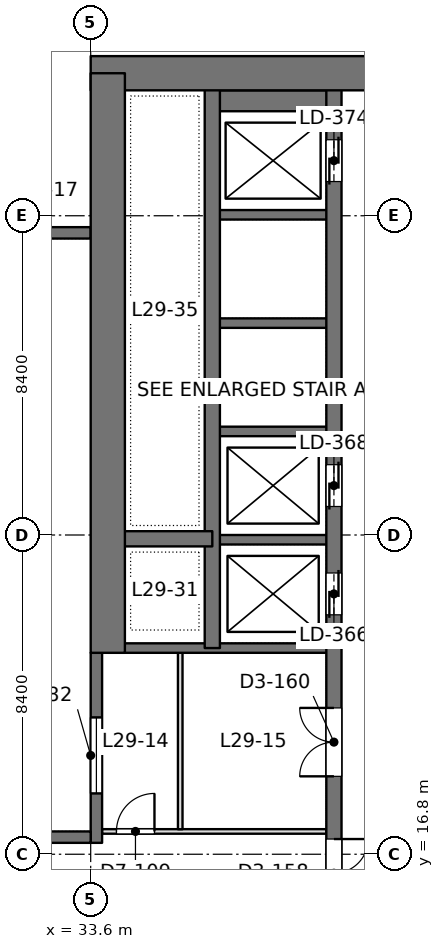
"""IFC4 building model, lengths in metres.
Left out: names, types, materials, properties, quantities, classifications, styles, units other than length and angle.
Written with IfcOpenShell. Run it as: python <this file> out.ifc"""

import sys

from ifc_helpers import new_model, si_unit, direction, frame, frame_2d, origin, place, context, subcontext, project, spatial, rectangle, extrude, element, fill, save


model = new_model("IFC4")
c1 = context("Model", 3, precision=1e-05, world=origin(), true_north=direction((0.0, 1.0)))
c2 = subcontext(c1, "Body", "Model", "MODEL_VIEW")
j1 = project(units=[si_unit("LENGTHUNIT", "METRE"), si_unit("PLANEANGLEUNIT", "RADIAN")], contexts=[c1])
p1 = place(None, origin())
s1 = spatial("IfcSite", under=j1, at=p1, CompositionType="ELEMENT")
p2 = place(p1, origin())
s2 = spatial("IfcBuilding", under=s1, at=p2, CompositionType="ELEMENT")
p3 = place(p2, frame((0.0, 0.0, 130.2)))
s3 = spatial("IfcBuildingStorey", under=s2, at=p3, CompositionType="ELEMENT", Elevation=130.2)
p4 = place(p3, frame((33.6, 37.35, 0.0), z_axis=(0.0, 0.0, 1.0), x_axis=(1.0, 0.0, 0.0)))
e1 = element("IfcWall", 1, at=p4, inside=s3, PredefinedType="SHEAR", context=c2, shape_type="SweptSolid", body=[
    extrude(rectangle(XDim=18.0, YDim=0.9, at=frame_2d((9.0, 0.0))), origin(), (0.0, 0.0, 1.0), 4.2),
])
p5 = place(p4, frame((7.25, 0.0, 0.0)))
e2 = element("IfcOpeningElement", 2, at=p5, cuts=e1, PredefinedType="OPENING", context=c2, shape_type="SweptSolid", body=[
    extrude(rectangle(XDim=1.8, YDim=2.4, at=frame_2d((0.9, 1.2))), frame((0.0, 0.46, 0.0), z_axis=(0.0, -1.0, 0.0), x_axis=(1.0, 0.0, 0.0)), (0.0, 0.0, 1.0), 0.92),
])
p6 = place(p3, frame((34.05, 22.1, 0.0), z_axis=(0.0, 0.0, 1.0), x_axis=(0.0, 1.0, 0.0)))
e3 = element("IfcWall", 3, at=p6, inside=s3, PredefinedType="SHEAR", context=c2, shape_type="SweptSolid", body=[
    extrude(rectangle(XDim=15.25, YDim=0.9, at=frame_2d((7.625, 0.0))), origin(), (0.0, 0.0, 1.0), 4.2),
])
p7 = place(p3, frame((40.0, 13.05, 0.0), z_axis=(0.0, 0.0, 1.0), x_axis=(0.0, 1.0, 0.0)))
e4 = element("IfcWall", 4, at=p7, inside=s3, PredefinedType="SHEAR", context=c2, shape_type="SweptSolid", body=[
    extrude(rectangle(XDim=24.3, YDim=0.4, at=frame_2d((12.15, 0.0))), origin(), (0.0, 0.0, 1.0), 4.2),
])
p8 = place(p7, frame((10.05, 0.0, 0.0)))
e5 = element("IfcOpeningElement", 5, at=p8, cuts=e4, PredefinedType="OPENING", context=c2, shape_type="SweptSolid", body=[
    extrude(rectangle(XDim=1.1, YDim=2.2, at=frame_2d((0.55, 1.1))), frame((0.0, 0.21, 0.0), z_axis=(0.0, -1.0, 0.0), x_axis=(1.0, 0.0, 0.0)), (0.0, 0.0, 1.0), 0.42),
])
p9 = place(p7, frame((12.9, 0.0, 0.0)))
e6 = element("IfcOpeningElement", 6, at=p9, cuts=e4, PredefinedType="OPENING", context=c2, shape_type="SweptSolid", body=[
    extrude(rectangle(XDim=1.1, YDim=2.2, at=frame_2d((0.55, 1.1))), frame((0.0, 0.21, 0.0), z_axis=(0.0, -1.0, 0.0), x_axis=(1.0, 0.0, 0.0)), (0.0, 0.0, 1.0), 0.42),
])
p10 = place(p7, frame((21.45, 0.0, 0.0)))
e7 = element("IfcOpeningElement", 7, at=p10, cuts=e4, PredefinedType="OPENING", context=c2, shape_type="SweptSolid", body=[
    extrude(rectangle(XDim=1.1, YDim=2.2, at=frame_2d((0.55, 1.1))), frame((0.0, 0.21, 0.0), z_axis=(0.0, -1.0, 0.0), x_axis=(1.0, 0.0, 0.0)), (0.0, 0.0, 1.0), 0.42),
])
p11 = place(p7, frame((2.35, 0.0, 0.0)))
e8 = element("IfcOpeningElement", 8, at=p11, cuts=e4, PredefinedType="OPENING", context=c2, shape_type="SweptSolid", body=[
    extrude(rectangle(XDim=1.8, YDim=2.4, at=frame_2d((0.9, 1.2))), frame((0.0, 0.21, 0.0), z_axis=(0.0, -1.0, 0.0), x_axis=(1.0, 0.0, 0.0)), (0.0, 0.0, 1.0), 0.42),
])
p12 = place(p7, frame((5.8, 0.0, 0.0)))
e9 = element("IfcOpeningElement", 9, at=p12, cuts=e4, PredefinedType="OPENING", context=c2, shape_type="SweptSolid", body=[
    extrude(rectangle(XDim=1.8, YDim=2.4, at=frame_2d((0.9, 1.2))), frame((0.0, 0.21, 0.0), z_axis=(0.0, -1.0, 0.0), x_axis=(1.0, 0.0, 0.0)), (0.0, 0.0, 1.0), 0.42),
])
p13 = place(p3, frame((36.8, 22.225, 0.0), z_axis=(0.0, 0.0, 1.0), x_axis=(0.0, 1.0, 0.0)))
e10 = element("IfcWall", 10, at=p13, inside=s3, PredefinedType="SHEAR", context=c2, shape_type="SweptSolid", body=[
    extrude(rectangle(XDim=15.125, YDim=0.4, at=frame_2d((7.562, 0.0))), origin(), (0.0, 0.0, 1.0), 4.2),
])
p14 = place(p3, frame((36.8, 25.1, 0.0), z_axis=(0.0, 0.0, 1.0), x_axis=(-1.0, 0.0, 0.0)))
e11 = element("IfcWall", 11, at=p14, inside=s3, PredefinedType="SHEAR", context=c2, shape_type="SweptSolid", body=[
    extrude(rectangle(XDim=2.75, YDim=0.4, at=frame_2d((1.375, 0.0))), origin(), (0.0, 0.0, 1.0), 4.2),
])
p15 = place(p3, frame((40.0, 22.225, 0.0), z_axis=(0.0, 0.0, 1.0), x_axis=(-1.0, 0.0, 0.0)))
e12 = element("IfcWall", 12, at=p15, inside=s3, PredefinedType="SHEAR", context=c2, shape_type="SweptSolid", body=[
    extrude(rectangle(XDim=5.95, YDim=0.25, at=frame_2d((2.975, 0.0))), origin(), (0.0, 0.0, 1.0), 4.2),
])
for number, where, z_axis, x_axis in (
    (13, (40.0, 25.075, 0.0), (0.0, 0.0, 1.0), (-1.0, 0.0, 0.0)),
    (14, (40.0, 27.925, 0.0), (0.0, 0.0, 1.0), (-1.0, 0.0, 0.0)),
    (15, (40.0, 30.775, 0.0), (0.0, 0.0, 1.0), (-1.0, 0.0, 0.0)),
    (16, (40.0, 33.625, 0.0), (0.0, 0.0, 1.0), (-1.0, 0.0, 0.0)),
):
    element("IfcWall", number, at=place(p3, frame(where, z_axis=z_axis, x_axis=x_axis)), inside=s3, PredefinedType="SHEAR", context=c2, shape_type="SweptSolid", body=[
        extrude(rectangle(XDim=3.2, YDim=0.25, at=frame_2d((1.6, 0.0))), origin(), (0.0, 0.0, 1.0), 4.2),
    ])
p16 = place(p3, frame((40.0, 36.625, 0.0), z_axis=(0.0, 0.0, 1.0), x_axis=(-1.0, 0.0, 0.0)))
e17 = element("IfcWall", 17, at=p16, inside=s3, PredefinedType="SHEAR", context=c2, shape_type="SweptSolid", body=[
    extrude(rectangle(XDim=3.2, YDim=0.55, at=frame_2d((1.6, 0.0))), origin(), (0.0, 0.0, 1.0), 4.2),
])
p17 = place(p3, frame((33.75, 17.1, 0.0), z_axis=(0.0, 0.0, 1.0), x_axis=(0.0, 1.0, 0.0)))
e18 = element("IfcWall", 18, at=p17, inside=s3, PredefinedType="SOLIDWALL", context=c2, shape_type="SweptSolid", body=[
    extrude(rectangle(XDim=5.0, YDim=0.3, at=frame_2d((2.5, 0.0))), origin(), (0.0, 0.0, 1.0), 4.05),
])
p18 = place(p17, frame((1.3, 0.0, 0.1)))
e19 = element("IfcOpeningElement", 19, at=p18, cuts=e18, PredefinedType="OPENING", context=c2, shape_type="SweptSolid", body=[
    extrude(rectangle(XDim=2.0, YDim=3.0, at=frame_2d((1.0, 1.5))), frame((0.0, 0.16, 0.0), z_axis=(0.0, -1.0, 0.0), x_axis=(1.0, 0.0, 0.0)), (0.0, 0.0, 1.0), 0.32),
])
p19 = place(p3, frame((26.025, 17.25, 0.0), z_axis=(0.0, 0.0, 1.0), x_axis=(1.0, 0.0, 0.0)))
e20 = element("IfcWall", 20, at=p19, inside=s3, PredefinedType="SOLIDWALL", context=c2, shape_type="SweptSolid", body=[
    extrude(rectangle(XDim=7.575, YDim=0.3, at=frame_2d((3.788, 0.0))), origin(), (0.0, 0.0, 1.0), 4.05),
])
p20 = place(p19, frame((0.587, 0.0, 0.1)))
e21 = element("IfcOpeningElement", 21, at=p20, cuts=e20, PredefinedType="OPENING", context=c2, shape_type="SweptSolid", body=[
    extrude(rectangle(XDim=2.0, YDim=3.0, at=frame_2d((1.0, 1.5))), frame((0.0, 0.16, 0.0), z_axis=(0.0, -1.0, 0.0), x_axis=(1.0, 0.0, 0.0)), (0.0, 0.0, 1.0), 0.32),
])
p21 = place(p19, frame((4.188, 0.0, 0.1)))
e22 = element("IfcOpeningElement", 22, at=p21, cuts=e20, PredefinedType="OPENING", context=c2, shape_type="SweptSolid", body=[
    extrude(rectangle(XDim=2.0, YDim=3.0, at=frame_2d((1.0, 1.5))), frame((0.0, 0.16, 0.0), z_axis=(0.0, -1.0, 0.0), x_axis=(1.0, 0.0, 0.0)), (0.0, 0.0, 1.0), 0.32),
])
p22 = place(p3, frame((26.025, 33.15, 0.0), z_axis=(0.0, 0.0, 1.0), x_axis=(1.0, 0.0, 0.0)))
e23 = element("IfcWall", 23, at=p22, inside=s3, PredefinedType="SOLIDWALL", context=c2, shape_type="SweptSolid", body=[
    extrude(rectangle(XDim=7.575, YDim=0.3, at=frame_2d((3.788, 0.0))), origin(), (0.0, 0.0, 1.0), 4.05),
])
p23 = place(p22, frame((0.587, 0.0, 0.1)))
e24 = element("IfcOpeningElement", 24, at=p23, cuts=e23, PredefinedType="OPENING", context=c2, shape_type="SweptSolid", body=[
    extrude(rectangle(XDim=2.0, YDim=3.0, at=frame_2d((1.0, 1.5))), frame((0.0, 0.16, 0.0), z_axis=(0.0, -1.0, 0.0), x_axis=(1.0, 0.0, 0.0)), (0.0, 0.0, 1.0), 0.32),
])
p24 = place(p22, frame((4.188, 0.0, 0.1)))
e25 = element("IfcOpeningElement", 25, at=p24, cuts=e23, PredefinedType="OPENING", context=c2, shape_type="SweptSolid", body=[
    extrude(rectangle(XDim=2.0, YDim=3.0, at=frame_2d((1.0, 1.5))), frame((0.0, 0.16, 0.0), z_axis=(0.0, -1.0, 0.0), x_axis=(1.0, 0.0, 0.0)), (0.0, 0.0, 1.0), 0.32),
])
p25 = place(p3, frame((33.898, 17.4, 0.0), z_axis=(0.0, 0.0, 1.0), x_axis=(1.0, 0.0, 0.0)))
e26 = element("IfcWall", 26, at=p25, inside=s3, PredefinedType="PARTITIONING", context=c2, shape_type="SweptSolid", body=[
    extrude(rectangle(XDim=5.904, YDim=0.12, at=frame_2d((2.952, 0.0))), origin(), (0.0, 0.0, 1.0), 3.55),
])
p26 = place(p25, frame((0.38, 0.0, 0.0)))
e27 = element("IfcOpeningElement", 27, at=p26, cuts=e26, PredefinedType="OPENING", context=c2, shape_type="SweptSolid", body=[
    extrude(rectangle(XDim=1.0, YDim=2.4, at=frame_2d((0.5, 1.2))), frame((0.0, 0.07, 0.0), z_axis=(0.0, -1.0, 0.0), x_axis=(1.0, 0.0, 0.0)), (0.0, 0.0, 1.0), 0.14),
])
p27 = place(p3, frame((35.956, 17.458, 0.0), z_axis=(0.0, 0.0, 1.0), x_axis=(0.0, 1.0, 0.0)))
e28 = element("IfcWall", 28, at=p27, inside=s3, PredefinedType="PARTITIONING", context=c2, shape_type="SweptSolid", body=[
    extrude(rectangle(XDim=4.644, YDim=0.12, at=frame_2d((2.322, 0.0))), origin(), (0.0, 0.0, 1.0), 3.6),
])
p28 = place(p18, origin())
e29 = element("IfcWindow", 29, at=p28, inside=s3, PartitioningType="SINGLE_PANEL", PredefinedType="WINDOW", context=c2, shape_type="SweptSolid", body=[
    extrude(rectangle(XDim=2.0, YDim=3.0, at=frame_2d((1.0, 1.5))), frame((0.0, 0.03, 0.0), z_axis=(0.0, -1.0, 0.0), x_axis=(1.0, 0.0, 0.0)), (0.0, 0.0, 1.0), 0.06),
])
fill(e19, e29)
p29 = place(p8, origin())
e30 = element("IfcDoor", 30, at=p29, inside=s3, OperationType="DOUBLE_DOOR_SLIDING", PredefinedType="DOOR", context=c2, shape_type="SweptSolid", body=[
    extrude(rectangle(XDim=1.1, YDim=2.2, at=frame_2d((0.55, 1.1))), frame((0.0, 0.025, 0.0), z_axis=(0.0, -1.0, 0.0), x_axis=(1.0, 0.0, 0.0)), (0.0, 0.0, 1.0), 0.05),
])
fill(e5, e30)
p30 = place(p9, origin())
e31 = element("IfcDoor", 31, at=p30, inside=s3, OperationType="DOUBLE_DOOR_SLIDING", PredefinedType="DOOR", context=c2, shape_type="SweptSolid", body=[
    extrude(rectangle(XDim=1.1, YDim=2.2, at=frame_2d((0.55, 1.1))), frame((0.0, 0.025, 0.0), z_axis=(0.0, -1.0, 0.0), x_axis=(1.0, 0.0, 0.0)), (0.0, 0.0, 1.0), 0.05),
])
fill(e6, e31)
p31 = place(p10, origin())
e32 = element("IfcDoor", 32, at=p31, inside=s3, OperationType="DOUBLE_DOOR_SLIDING", PredefinedType="DOOR", context=c2, shape_type="SweptSolid", body=[
    extrude(rectangle(XDim=1.1, YDim=2.2, at=frame_2d((0.55, 1.1))), frame((0.0, 0.025, 0.0), z_axis=(0.0, -1.0, 0.0), x_axis=(1.0, 0.0, 0.0)), (0.0, 0.0, 1.0), 0.05),
])
fill(e7, e32)
p32 = place(p11, frame((1.8, 0.0, 0.0), z_axis=(0.0, 0.0, 1.0), x_axis=(-1.0, 0.0, 0.0)))
e33 = element("IfcDoor", 33, at=p32, inside=s3, OperationType="DOUBLE_DOOR_SINGLE_SWING", PredefinedType="DOOR", context=c2, shape_type="SweptSolid", body=[
    extrude(rectangle(XDim=1.8, YDim=2.4, at=frame_2d((0.9, 1.2))), frame((0.0, 0.025, 0.0), z_axis=(0.0, -1.0, 0.0), x_axis=(1.0, 0.0, 0.0)), (0.0, 0.0, 1.0), 0.05),
])
fill(e8, e33)
p33 = place(p12, origin())
e34 = element("IfcDoor", 34, at=p33, inside=s3, OperationType="DOUBLE_DOOR_SINGLE_SWING", PredefinedType="DOOR", context=c2, shape_type="SweptSolid", body=[
    extrude(rectangle(XDim=1.8, YDim=2.4, at=frame_2d((0.9, 1.2))), frame((0.0, 0.025, 0.0), z_axis=(0.0, -1.0, 0.0), x_axis=(1.0, 0.0, 0.0)), (0.0, 0.0, 1.0), 0.05),
])
fill(e9, e34)
p34 = place(p26, origin())
e35 = element("IfcDoor", 35, at=p34, inside=s3, OperationType="SINGLE_SWING_RIGHT", PredefinedType="DOOR", context=c2, shape_type="SweptSolid", body=[
    extrude(rectangle(XDim=1.0, YDim=2.4, at=frame_2d((0.5, 1.2))), frame((0.0, 0.025, 0.0), z_axis=(0.0, -1.0, 0.0), x_axis=(1.0, 0.0, 0.0)), (0.0, 0.0, 1.0), 0.05),
])
fill(e27, e35)
save(model, sys.argv[1])
